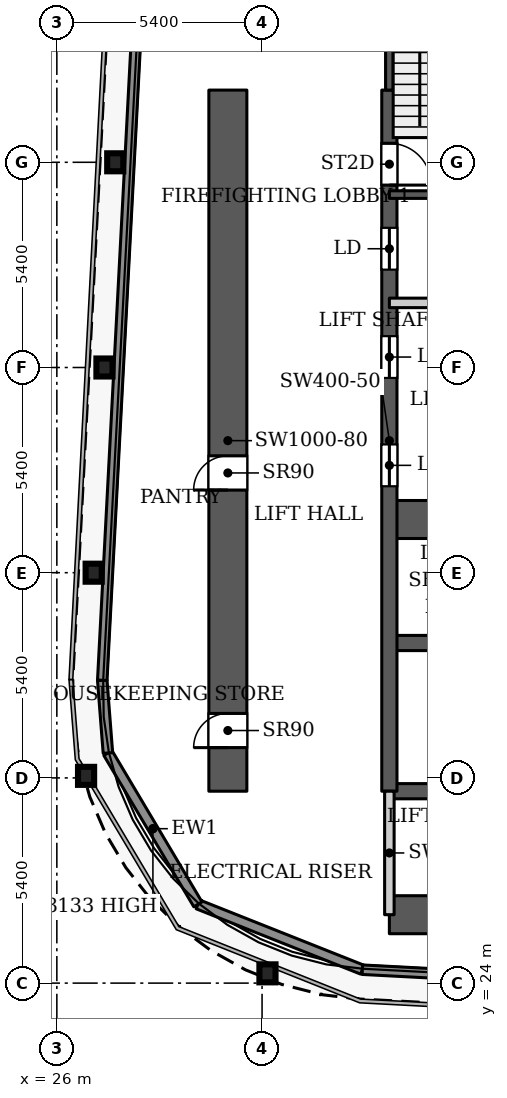
"""IFC4 building model, lengths in metres.
Left out: names, types, materials, properties, quantities, classifications, styles, units other than length and angle.
Written with IfcOpenShell. Run it as: python <this file> out.ifc"""

import sys

from ifc_helpers import new_model, si_unit, direction, frame, frame_2d, origin, origin_2d, place, context, subcontext, project, spatial, rectangle, i_section, extrude, source, transform, mapped, element, fill, save


model = new_model("IFC4")
c1 = context("Model", 3, precision=1e-05, world=origin(), true_north=direction((0.0, 1.0)))
c2 = subcontext(c1, "Body", "Model", "MODEL_VIEW")
j1 = project(units=[si_unit("LENGTHUNIT", "METRE"), si_unit("PLANEANGLEUNIT", "RADIAN")], contexts=[c1])
p1 = place(None, origin())
s1 = spatial("IfcSite", under=j1, at=p1, CompositionType="ELEMENT")
p2 = place(p1, origin())
s2 = spatial("IfcBuilding", under=s1, at=p2, CompositionType="ELEMENT")
p3 = place(p2, frame((0.0, 0.0, 69.5)))
s3 = spatial("IfcBuildingStorey", under=s2, at=p3, CompositionType="ELEMENT", Elevation=69.5)
for number, where, z_axis, x_axis in (
    (1, (31.542, 24.257, 0.0), (0.0, 0.0, 1.0), (1.0, 0.0, 0.0)),
    (2, (26.769, 29.454, 0.0), (0.0, 0.0, 1.0), (1.0, 0.0, 0.0)),
    (3, (26.969, 34.8, 0.0), (0.0, 0.0, 1.0), (1.0, 0.0, 0.0)),
    (4, (27.253, 40.2, 0.0), (0.0, 0.0, 1.0), (1.0, 0.0, 0.0)),
    (5, (27.537, 45.6, 0.0), (0.0, 0.0, 1.0), (1.0, 0.0, 0.0)),
):
    element("IfcColumn", number, at=place(p3, frame(where, z_axis=z_axis, x_axis=x_axis)), inside=s3, PredefinedType="COLUMN", context=c2, shape_type="SweptSolid", body=[
        extrude(i_section(OverallWidth=0.424, OverallDepth=0.474, WebThickness=0.048, FlangeThickness=0.077, FilletRadius=0.014, at=origin_2d()), origin(), (0.0, 0.0, 1.0), 3.9),
    ])
p4 = place(p3, frame((34.75, 25.8, 0.0), z_axis=(0.0, 0.0, 1.0), x_axis=(1.0, 0.0, 0.0)))
e6 = element("IfcWall", 6, at=p4, inside=s3, PredefinedType="SHEAR", context=c2, shape_type="SweptSolid", body=[
    extrude(rectangle(XDim=18.4, YDim=1.0, at=frame_2d((9.2, 0.0))), origin(), (0.0, 0.0, 1.0), 3.9),
])
p5 = place(p3, frame((34.75, 29.05, 0.0), z_axis=(0.0, 0.0, 1.0), x_axis=(1.0, 0.0, 0.0)))
e7 = element("IfcWall", 7, at=p5, inside=s3, PredefinedType="SHEAR", context=c2, shape_type="SweptSolid", body=[
    extrude(rectangle(XDim=18.4, YDim=0.4, at=frame_2d((9.2, 0.0))), origin(), (0.0, 0.0, 1.0), 3.9),
])
p6 = place(p5, frame((15.125, 0.0, 0.0)))
e8 = element("IfcOpeningElement", 8, at=p6, cuts=e7, PredefinedType="OPENING", context=c2, shape_type="SweptSolid", body=[
    extrude(rectangle(XDim=1.1, YDim=2.2, at=frame_2d((0.55, 1.1))), frame((0.0, 0.21, 0.0), z_axis=(0.0, -1.0, 0.0), x_axis=(1.0, 0.0, 0.0)), (0.0, 0.0, 1.0), 0.42),
])
p7 = place(p3, frame((34.75, 32.95, 0.0), z_axis=(0.0, 0.0, 1.0), x_axis=(1.0, 0.0, 0.0)))
e9 = element("IfcWall", 9, at=p7, inside=s3, PredefinedType="SHEAR", context=c2, shape_type="SweptSolid", body=[
    extrude(rectangle(XDim=14.25, YDim=0.4, at=frame_2d((7.125, 0.0))), origin(), (0.0, 0.0, 1.0), 3.9),
])
p8 = place(p3, frame((34.75, 36.2, 0.0), z_axis=(0.0, 0.0, 1.0), x_axis=(1.0, 0.0, 0.0)))
e10 = element("IfcWall", 10, at=p8, inside=s3, PredefinedType="SHEAR", context=c2, shape_type="SweptSolid", body=[
    extrude(rectangle(XDim=18.4, YDim=1.0, at=frame_2d((9.2, 0.0))), origin(), (0.0, 0.0, 1.0), 3.9),
])
p9 = place(p8, frame((16.9, 0.0, 0.0)))
e11 = element("IfcOpeningElement", 11, at=p9, cuts=e10, PredefinedType="OPENING", context=c2, shape_type="SweptSolid", body=[
    extrude(rectangle(XDim=1.0, YDim=2.2, at=frame_2d((0.5, 1.1))), frame((0.0, 0.51, 0.0), z_axis=(0.0, -1.0, 0.0), x_axis=(1.0, 0.0, 0.0)), (0.0, 0.0, 1.0), 1.02),
])
p10 = place(p3, frame((34.75, 29.05, 0.0), z_axis=(0.0, 0.0, 1.0), x_axis=(0.0, 1.0, 0.0)))
e12 = element("IfcWall", 12, at=p10, inside=s3, PredefinedType="SHEAR", context=c2, shape_type="SweptSolid", body=[
    extrude(rectangle(XDim=18.45, YDim=0.4, at=frame_2d((9.225, 0.0))), origin(), (0.0, 0.0, 1.0), 3.9),
])
p11 = place(p10, frame((8.025, 0.0, 0.0)))
e13 = element("IfcOpeningElement", 13, at=p11, cuts=e12, PredefinedType="OPENING", context=c2, shape_type="SweptSolid", body=[
    extrude(rectangle(XDim=1.1, YDim=2.2, at=frame_2d((0.55, 1.1))), frame((0.0, 0.21, 0.0), z_axis=(0.0, -1.0, 0.0), x_axis=(1.0, 0.0, 0.0)), (0.0, 0.0, 1.0), 0.42),
])
p12 = place(p10, frame((10.875, 0.0, 0.0)))
e14 = element("IfcOpeningElement", 14, at=p12, cuts=e12, PredefinedType="OPENING", context=c2, shape_type="SweptSolid", body=[
    extrude(rectangle(XDim=1.1, YDim=2.2, at=frame_2d((0.55, 1.1))), frame((0.0, 0.21, 0.0), z_axis=(0.0, -1.0, 0.0), x_axis=(1.0, 0.0, 0.0)), (0.0, 0.0, 1.0), 0.42),
])
p13 = place(p10, frame((13.725, 0.0, 0.0)))
e15 = element("IfcOpeningElement", 15, at=p13, cuts=e12, PredefinedType="OPENING", context=c2, shape_type="SweptSolid", body=[
    extrude(rectangle(XDim=1.1, YDim=2.2, at=frame_2d((0.55, 1.1))), frame((0.0, 0.21, 0.0), z_axis=(0.0, -1.0, 0.0), x_axis=(1.0, 0.0, 0.0)), (0.0, 0.0, 1.0), 0.42),
])
p14 = place(p10, frame((15.95, 0.0, 0.0)))
e16 = element("IfcOpeningElement", 16, at=p14, cuts=e12, PredefinedType="OPENING", context=c2, shape_type="SweptSolid", body=[
    extrude(rectangle(XDim=1.1, YDim=2.2, at=frame_2d((0.55, 1.1))), frame((0.0, 0.21, 0.0), z_axis=(0.0, -1.0, 0.0), x_axis=(1.0, 0.0, 0.0)), (0.0, 0.0, 1.0), 0.42),
])
p15 = place(p3, frame((30.5, 29.05, 0.0), z_axis=(0.0, 0.0, 1.0), x_axis=(0.0, 1.0, 0.0)))
e17 = element("IfcWall", 17, at=p15, inside=s3, PredefinedType="SHEAR", context=c2, shape_type="SweptSolid", body=[
    extrude(rectangle(XDim=18.45, YDim=1.0, at=frame_2d((9.225, 0.0))), origin(), (0.0, 0.0, 1.0), 3.9),
])
p16 = place(p15, frame((1.147, 0.0, 0.0)))
e18 = element("IfcOpeningElement", 18, at=p16, cuts=e17, PredefinedType="OPENING", context=c2, shape_type="SweptSolid", body=[
    extrude(rectangle(XDim=0.9, YDim=2.2, at=frame_2d((0.45, 1.1))), frame((0.0, 0.51, 0.0), z_axis=(0.0, -1.0, 0.0), x_axis=(1.0, 0.0, 0.0)), (0.0, 0.0, 1.0), 1.02),
])
p17 = place(p15, frame((7.925, 0.0, 0.0)))
e19 = element("IfcOpeningElement", 19, at=p17, cuts=e17, PredefinedType="OPENING", context=c2, shape_type="SweptSolid", body=[
    extrude(rectangle(XDim=0.9, YDim=2.2, at=frame_2d((0.45, 1.1))), frame((0.0, 0.51, 0.0), z_axis=(0.0, -1.0, 0.0), x_axis=(1.0, 0.0, 0.0)), (0.0, 0.0, 1.0), 1.02),
])
p18 = place(p3, frame((34.039, 24.353, 0.0), z_axis=(0.0, 0.0, 1.0), x_axis=(-0.929352825399, 0.369192803184, 0.0)))
e20 = element("IfcWall", 20, at=p18, inside=s3, PredefinedType="SOLIDWALL", context=c2, shape_type="SweptSolid", body=[
    extrude(rectangle(XDim=4.656, YDim=0.25, at=frame_2d((2.328, 0.0))), origin(), (0.0, 0.0, 1.0), 3.75),
])
p19 = place(p3, frame((29.712, 26.072, 0.0), z_axis=(0.0, 0.0, 1.0), x_axis=(-0.511028049012, 0.859564036662, 0.0)))
e21 = element("IfcWall", 21, at=p19, inside=s3, PredefinedType="SOLIDWALL", context=c2, shape_type="SweptSolid", body=[
    extrude(rectangle(XDim=4.634, YDim=0.25, at=frame_2d((2.317, 0.0))), origin(), (0.0, 0.0, 1.0), 3.133),
])
p20 = place(p3, frame((27.344, 30.055, 0.0), z_axis=(0.0, 0.0, 1.0), x_axis=(-0.077571675317, 0.99698677784, 0.0)))
e22 = element("IfcWall", 22, at=p20, inside=s3, PredefinedType="SOLIDWALL", context=c2, shape_type="SweptSolid", body=[
    extrude(rectangle(XDim=1.92, YDim=0.25, at=frame_2d((0.96, 0.0))), origin(), (0.0, 0.0, 1.0), 3.75),
])
p21 = place(p3, frame((27.195, 31.969, 0.0), z_axis=(0.0, 0.0, 1.0), x_axis=(0.052554995867, 0.998618031286, 0.0)))
e23 = element("IfcWall", 23, at=p21, inside=s3, PredefinedType="SOLIDWALL", context=c2, shape_type="SweptSolid", body=[
    extrude(rectangle(XDim=66.787, YDim=0.25, at=frame_2d((33.394, 0.0))), origin(), (0.0, 0.0, 1.0), 3.75),
])
p22 = place(p3, frame((100.586, 20.85, 0.0), z_axis=(0.0, 0.0, 1.0), x_axis=(-0.99861746497, 0.052565755559, 0.0)))
e24 = element("IfcWall", 24, at=p22, inside=s3, PredefinedType="SOLIDWALL", context=c2, shape_type="SweptSolid", body=[
    extrude(rectangle(XDim=66.639, YDim=0.25, at=frame_2d((33.319, 0.0))), origin(), (0.0, 0.0, 1.0), 3.75),
])
p23 = place(p3, frame((34.75, 44.75, 0.0), z_axis=(0.0, 0.0, 1.0), x_axis=(1.0, 0.0, 0.0)))
e25 = element("IfcWall", 25, at=p23, inside=s3, PredefinedType="SHEAR", context=c2, shape_type="SweptSolid", body=[
    extrude(rectangle(XDim=3.15, YDim=0.2, at=frame_2d((1.575, 0.0))), origin(), (0.0, 0.0, 1.0), 3.9),
])
p24 = place(p3, frame((34.75, 47.5, 0.0), z_axis=(0.0, 0.0, 1.0), x_axis=(0.0, 1.0, 0.0)))
e26 = element("IfcWall", 26, at=p24, inside=s3, PredefinedType="SHEAR", context=c2, shape_type="SweptSolid", body=[
    extrude(rectangle(XDim=6.41, YDim=0.2, at=frame_2d((3.205, 0.0))), origin(), (0.0, 0.0, 1.0), 3.9),
])
for number, where, z_axis, x_axis in (
    (27, (34.75, 25.8, 0.0), (0.0, 0.0, 1.0), (0.0, 1.0, 0.0)),
    (28, (34.75, 41.9, 0.0), (0.0, 0.0, 1.0), (1.0, 0.0, 0.0)),
):
    element("IfcWall", number, at=place(p3, frame(where, z_axis=z_axis, x_axis=x_axis)), inside=s3, PredefinedType="PARTITIONING", context=c2, shape_type="SweptSolid", body=[
        extrude(rectangle(XDim=3.25, YDim=0.25, at=frame_2d((1.625, 0.0))), origin(), (0.0, 0.0, 1.0), 3.9),
    ])
m1 = source(origin(), c2, "Body", "SweptSolid", [
    extrude(rectangle(XDim=1.1, YDim=2.2, at=frame_2d((0.55, 1.1))), frame((0.0, 0.025, 0.0), z_axis=(0.0, -1.0, 0.0), x_axis=(1.0, 0.0, 0.0)), (0.0, 0.0, 1.0), 0.05),
])
p25 = place(p11, origin())
e29 = element("IfcDoor", 29, at=p25, inside=s3, OperationType="SLIDING_TO_LEFT", PredefinedType="DOOR", context=c2, shape_type="MappedRepresentation", body=[
    mapped(m1, transform((0.0, 0.0, 0.0), x_axis=(1.0, 0.0, 0.0), y_axis=(0.0, 1.0, 0.0), z_axis=(0.0, 0.0, 1.0), scale=1.0)),
])
fill(e13, e29)
p26 = place(p12, origin())
e30 = element("IfcDoor", 30, at=p26, inside=s3, OperationType="SLIDING_TO_LEFT", PredefinedType="DOOR", context=c2, shape_type="MappedRepresentation", body=[
    mapped(m1, transform((0.0, 0.0, 0.0), x_axis=(1.0, 0.0, 0.0), y_axis=(0.0, 1.0, 0.0), z_axis=(0.0, 0.0, 1.0), scale=1.0)),
])
fill(e14, e30)
p27 = place(p13, origin())
e31 = element("IfcDoor", 31, at=p27, inside=s3, OperationType="SLIDING_TO_LEFT", PredefinedType="DOOR", context=c2, shape_type="MappedRepresentation", body=[
    mapped(m1, transform((0.0, 0.0, 0.0), x_axis=(1.0, 0.0, 0.0), y_axis=(0.0, 1.0, 0.0), z_axis=(0.0, 0.0, 1.0), scale=1.0)),
])
fill(e15, e31)
m2 = source(origin(), c2, "Body", "SweptSolid", [
    extrude(rectangle(XDim=0.9, YDim=2.2, at=frame_2d((0.45, 1.1))), frame((0.0, 0.025, 0.0), z_axis=(0.0, -1.0, 0.0), x_axis=(1.0, 0.0, 0.0)), (0.0, 0.0, 1.0), 0.05),
])
p28 = place(p16, origin())
e32 = element("IfcDoor", 32, at=p28, inside=s3, OperationType="SINGLE_SWING_LEFT", PredefinedType="DOOR", context=c2, shape_type="MappedRepresentation", body=[
    mapped(m2, transform((0.0, 0.0, 0.0), x_axis=(1.0, 0.0, 0.0), y_axis=(0.0, 1.0, 0.0), z_axis=(0.0, 0.0, 1.0), scale=1.0)),
])
fill(e18, e32)
p29 = place(p17, origin())
e33 = element("IfcDoor", 33, at=p29, inside=s3, OperationType="SINGLE_SWING_LEFT", PredefinedType="DOOR", context=c2, shape_type="MappedRepresentation", body=[
    mapped(m2, transform((0.0, 0.0, 0.0), x_axis=(1.0, 0.0, 0.0), y_axis=(0.0, 1.0, 0.0), z_axis=(0.0, 0.0, 1.0), scale=1.0)),
])
fill(e19, e33)
m3 = source(origin(), c2, "Body", "SweptSolid", [
    extrude(rectangle(XDim=1.1, YDim=2.2, at=frame_2d((0.55, 1.1))), frame((0.0, 0.025, 0.0), z_axis=(0.0, -1.0, 0.0), x_axis=(1.0, 0.0, 0.0)), (0.0, 0.0, 1.0), 0.05),
])
p30 = place(p14, origin())
e34 = element("IfcDoor", 34, at=p30, inside=s3, OperationType="SINGLE_SWING_RIGHT", PredefinedType="DOOR", context=c2, shape_type="MappedRepresentation", body=[
    mapped(m3, transform((0.0, 0.0, 0.0), x_axis=(1.0, 0.0, 0.0), y_axis=(0.0, 1.0, 0.0), z_axis=(0.0, 0.0, 1.0), scale=1.0)),
])
fill(e16, e34)
save(model, sys.argv[1])
